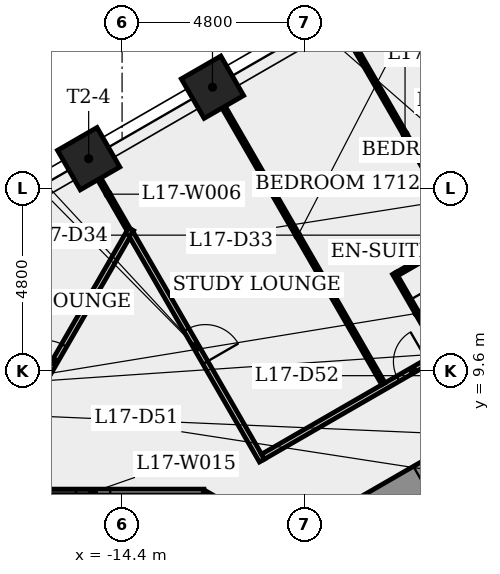
"""IFC4 building model, lengths in metres.
Left out: names, types, materials, properties, quantities, classifications, styles, units other than length and angle.
Written with IfcOpenShell. Run it as: python <this file> out.ifc"""

import sys

from ifc_helpers import new_model, si_unit, direction, frame, frame_2d, origin, origin_2d, place, context, subcontext, project, spatial, rectangle, extrude, element, fill, save


model = new_model("IFC4")
c1 = context("Model", 3, precision=1e-05, world=origin(), true_north=direction((0.0, 1.0)))
c2 = subcontext(c1, "Body", "Model", "MODEL_VIEW")
j1 = project(units=[si_unit("LENGTHUNIT", "METRE"), si_unit("PLANEANGLEUNIT", "RADIAN")], contexts=[c1])
p1 = place(None, origin())
s1 = spatial("IfcSite", under=j1, at=p1, CompositionType="ELEMENT")
p2 = place(p1, origin())
s2 = spatial("IfcBuilding", under=s1, at=p2, CompositionType="ELEMENT")
p3 = place(p2, frame((0.0, 0.0, 66.3)))
s3 = spatial("IfcBuildingStorey", under=s2, at=p3, CompositionType="ELEMENT", Elevation=66.3)
p4 = place(p3, frame((0.2, 10.623, 0.0), z_axis=(0.0, 0.0, 1.0), x_axis=(-0.866023993627, -0.500002442456, 0.0)))
e1 = element("IfcWall", 1, at=p4, inside=s3, PredefinedType="SHEAR", context=c2, shape_type="SweptSolid", body=[
    extrude(rectangle(XDim=10.97, YDim=0.8, at=frame_2d((5.485, 0.0))), origin(), (0.0, 0.0, 1.0), 4.0),
])
p5 = place(p4, frame((6.877, 0.0, 0.0)))
e2 = element("IfcOpeningElement", 2, at=p5, cuts=e1, PredefinedType="OPENING", context=c2, shape_type="SweptSolid", body=[
    extrude(rectangle(XDim=0.9, YDim=2.1, at=frame_2d((0.45, 1.05))), frame((0.0, 0.41, 0.0), z_axis=(0.0, -1.0, 0.0), x_axis=(1.0, 0.0, 0.0)), (0.0, 0.0, 1.0), 0.82),
])
for number, where, z_axis, x_axis in (
    (3, (-12.021, 17.06, 0.0), (0.0, 0.0, 1.0), (-0.5, 0.866, 0.0)),
    (4, (-15.28, 15.178, 0.0), (0.0, 0.0, 1.0), (-0.5, 0.866, 0.0)),
):
    element("IfcColumn", number, at=place(p3, frame(where, z_axis=z_axis, x_axis=x_axis)), inside=s3, PredefinedType="COLUMN", context=c2, shape_type="SweptSolid", body=[
        extrude(rectangle(XDim=1.2, YDim=1.2, at=origin_2d()), origin(), (0.0, 0.0, 1.0), 4.0),
    ])
p6 = place(p3, frame((-18.19, 6.343, 0.0), z_axis=(0.0, 0.0, 1.0), x_axis=(0.499980305572, 0.866036774069, 0.0)))
e5 = element("IfcWall", 5, at=p6, inside=s3, PredefinedType="PARTITIONING", context=c2, shape_type="SweptSolid", body=[
    extrude(rectangle(XDim=8.059, YDim=0.15, at=frame_2d((4.03, 0.0))), origin(), (0.0, 0.0, 1.0), 3.6),
])
p7 = place(p6, frame((3.53, 0.0, 0.0)))
e6 = element("IfcOpeningElement", 6, at=p7, cuts=e5, PredefinedType="OPENING", context=c2, shape_type="SweptSolid", body=[
    extrude(rectangle(XDim=1.0, YDim=2.1, at=frame_2d((0.5, 1.05))), frame((0.0, 0.085, 0.0), z_axis=(0.0, -1.0, 0.0), x_axis=(1.0, 0.0, 0.0)), (0.0, 0.0, 1.0), 0.17),
])
p8 = place(p3, frame((-15.3, 15.166, 0.0), z_axis=(0.0, 0.0, 1.0), x_axis=(0.499937513688, -0.866061477268, 0.0)))
e7 = element("IfcWall", 7, at=p8, inside=s3, PredefinedType="PARTITIONING", context=c2, shape_type="SweptSolid", body=[
    extrude(rectangle(XDim=2.129, YDim=0.1, at=frame_2d((1.064, 0.0))), origin(), (0.0, 0.0, 1.0), 3.6),
])
p9 = place(p3, frame((-14.161, 13.192, 0.0), z_axis=(0.0, 0.0, 1.0), x_axis=(0.500005038635, -0.866022494708, 0.0)))
e8 = element("IfcWall", 8, at=p9, inside=s3, PredefinedType="PARTITIONING", context=c2, shape_type="SweptSolid", body=[
    extrude(rectangle(XDim=6.88, YDim=0.15, at=frame_2d((3.44, 0.0))), origin(), (0.0, 0.0, 1.0), 3.6),
])
p10 = place(p9, frame((2.903, 0.0, 0.0)))
e9 = element("IfcOpeningElement", 9, at=p10, cuts=e8, PredefinedType="OPENING", context=c2, shape_type="SweptSolid", body=[
    extrude(rectangle(XDim=1.0, YDim=2.1, at=frame_2d((0.5, 1.05))), frame((0.0, 0.085, 0.0), z_axis=(0.0, -1.0, 0.0), x_axis=(1.0, 0.0, 0.0)), (0.0, 0.0, 1.0), 0.17),
])
p11 = place(p3, frame((-12.247, 6.407, 0.0), z_axis=(0.0, 0.0, 1.0), x_axis=(-1.0, 0.0, 0.0)))
e10 = element("IfcWall", 10, at=p11, inside=s3, PredefinedType="PARTITIONING", context=c2, shape_type="SweptSolid", body=[
    extrude(rectangle(XDim=5.831, YDim=0.15, at=frame_2d((2.916, 0.0))), origin(), (0.0, 0.0, 1.0), 3.6),
])
p12 = place(p11, frame((2.466, 0.0, 0.0)))
e11 = element("IfcOpeningElement", 11, at=p12, cuts=e10, PredefinedType="OPENING", context=c2, shape_type="SweptSolid", body=[
    extrude(rectangle(XDim=0.9, YDim=2.1, at=frame_2d((0.45, 1.05))), frame((0.0, 0.085, 0.0), z_axis=(0.0, -1.0, 0.0), x_axis=(1.0, 0.0, 0.0)), (0.0, 0.0, 1.0), 0.17),
])
p13 = place(p3, frame((-11.765, 6.1, 0.0), z_axis=(0.0, 0.0, 1.0), x_axis=(-0.865893856247, 0.500227777832, 0.0)))
e12 = element("IfcWall", 12, at=p13, inside=s3, PredefinedType="PARTITIONING", context=c2, shape_type="SweptSolid", body=[
    extrude(rectangle(XDim=0.572, YDim=0.15, at=frame_2d((0.286, 0.0))), origin(), (0.0, 0.0, 1.0), 3.6),
])
p14 = place(p3, frame((-10.693, 7.336, 0.0), z_axis=(0.0, 0.0, 1.0), x_axis=(0.866018601944, 0.500011780947, 0.0)))
e13 = element("IfcWall", 13, at=p14, inside=s3, PredefinedType="PARTITIONING", context=c2, shape_type="SweptSolid", body=[
    extrude(rectangle(XDim=10.835, YDim=0.15, at=frame_2d((5.417, 0.0))), origin(), (0.0, 0.0, 1.0), 3.6),
])
p15 = place(p14, frame((4.103, 0.0, 0.0)))
e14 = element("IfcOpeningElement", 14, at=p15, cuts=e13, PredefinedType="OPENING", context=c2, shape_type="SweptSolid", body=[
    extrude(rectangle(XDim=0.9, YDim=2.1, at=frame_2d((0.45, 1.05))), frame((0.0, 0.085, 0.0), z_axis=(0.0, -1.0, 0.0), x_axis=(1.0, 0.0, 0.0)), (0.0, 0.0, 1.0), 0.17),
])
p16 = place(p3, frame((-7.523, 9.253, 0.0), z_axis=(0.0, 0.0, 1.0), x_axis=(-0.500009404554, 0.866019973994, 0.0)))
e15 = element("IfcWall", 15, at=p16, inside=s3, PredefinedType="PARTITIONING", context=c2, shape_type="SweptSolid", body=[
    extrude(rectangle(XDim=9.01, YDim=0.1, at=frame_2d((4.505, 0.0))), origin(), (0.0, 0.0, 1.0), 3.6),
])
p17 = place(p3, frame((-7.239, 12.16, 0.0), z_axis=(0.0, 0.0, 1.0), x_axis=(0.499986429846, -0.866033238375, 0.0)))
e16 = element("IfcWall", 16, at=p17, inside=s3, PredefinedType="PARTITIONING", context=c2, shape_type="SweptSolid", body=[
    extrude(rectangle(XDim=2.375, YDim=0.1, at=frame_2d((1.188, 0.0))), origin(), (0.0, 0.0, 1.0), 3.6),
])
p18 = place(p17, frame((0.812, 0.0, 0.0)))
e17 = element("IfcOpeningElement", 17, at=p18, cuts=e16, PredefinedType="OPENING", context=c2, shape_type="SweptSolid", body=[
    extrude(rectangle(XDim=0.8, YDim=2.1, at=frame_2d((0.4, 1.05))), frame((0.0, 0.06, 0.0), z_axis=(0.0, -1.0, 0.0), x_axis=(1.0, 0.0, 0.0)), (0.0, 0.0, 1.0), 0.12),
])
p19 = place(p3, frame((-7.17, 12.141, 0.0), z_axis=(0.0, 0.0, 1.0), x_axis=(0.866036909293, 0.499980071345, 0.0)))
e18 = element("IfcWall", 18, at=p19, inside=s3, PredefinedType="PARTITIONING", context=c2, shape_type="SweptSolid", body=[
    extrude(rectangle(XDim=4.156, YDim=0.1, at=frame_2d((2.078, 0.0))), origin(), (0.0, 0.0, 1.0), 3.6),
])
p20 = place(p3, frame((-8.756, 18.945, 0.0), z_axis=(0.0, 0.0, 1.0), x_axis=(0.500009404554, -0.866019973994, 0.0)))
e19 = element("IfcWall", 19, at=p20, inside=s3, PredefinedType="PARTITIONING", context=c2, shape_type="SweptSolid", body=[
    extrude(rectangle(XDim=9.01, YDim=0.1, at=frame_2d((4.505, 0.0))), origin(), (0.0, 0.0, 1.0), 3.6),
])
p21 = place(p7, origin())
e20 = element("IfcDoor", 20, at=p21, inside=s3, OperationType="SINGLE_SWING_LEFT", PredefinedType="DOOR", context=c2, shape_type="SweptSolid", body=[
    extrude(rectangle(XDim=1.0, YDim=2.1, at=frame_2d((0.5, 1.05))), frame((0.0, 0.025, 0.0), z_axis=(0.0, -1.0, 0.0), x_axis=(1.0, 0.0, 0.0)), (0.0, 0.0, 1.0), 0.05),
])
fill(e6, e20)
p22 = place(p12, origin())
e21 = element("IfcDoor", 21, at=p22, inside=s3, OperationType="SINGLE_SWING_RIGHT", PredefinedType="DOOR", context=c2, shape_type="SweptSolid", body=[
    extrude(rectangle(XDim=0.9, YDim=2.1, at=frame_2d((0.45, 1.05))), frame((0.0, 0.025, 0.0), z_axis=(0.0, -1.0, 0.0), x_axis=(1.0, 0.0, 0.0)), (0.0, 0.0, 1.0), 0.05),
])
fill(e11, e21)
p23 = place(p15, origin())
e22 = element("IfcDoor", 22, at=p23, inside=s3, OperationType="SINGLE_SWING_RIGHT", PredefinedType="DOOR", context=c2, shape_type="SweptSolid", body=[
    extrude(rectangle(XDim=0.9, YDim=2.1, at=frame_2d((0.45, 1.05))), frame((0.0, 0.025, 0.0), z_axis=(0.0, -1.0, 0.0), x_axis=(1.0, 0.0, 0.0)), (0.0, 0.0, 1.0), 0.05),
])
fill(e14, e22)
p24 = place(p18, origin())
e23 = element("IfcDoor", 23, at=p24, inside=s3, OperationType="SINGLE_SWING_LEFT", PredefinedType="DOOR", context=c2, shape_type="SweptSolid", body=[
    extrude(rectangle(XDim=0.8, YDim=2.1, at=frame_2d((0.4, 1.05))), frame((0.0, 0.025, 0.0), z_axis=(0.0, -1.0, 0.0), x_axis=(1.0, 0.0, 0.0)), (0.0, 0.0, 1.0), 0.05),
])
fill(e17, e23)
p25 = place(p10, origin())
e24 = element("IfcDoor", 24, at=p25, inside=s3, OperationType="SINGLE_SWING_RIGHT", PredefinedType="DOOR", context=c2, shape_type="SweptSolid", body=[
    extrude(rectangle(XDim=1.0, YDim=2.1, at=frame_2d((0.5, 1.05))), frame((0.0, 0.025, 0.0), z_axis=(0.0, -1.0, 0.0), x_axis=(1.0, 0.0, 0.0)), (0.0, 0.0, 1.0), 0.05),
])
fill(e9, e24)
save(model, sys.argv[1])
